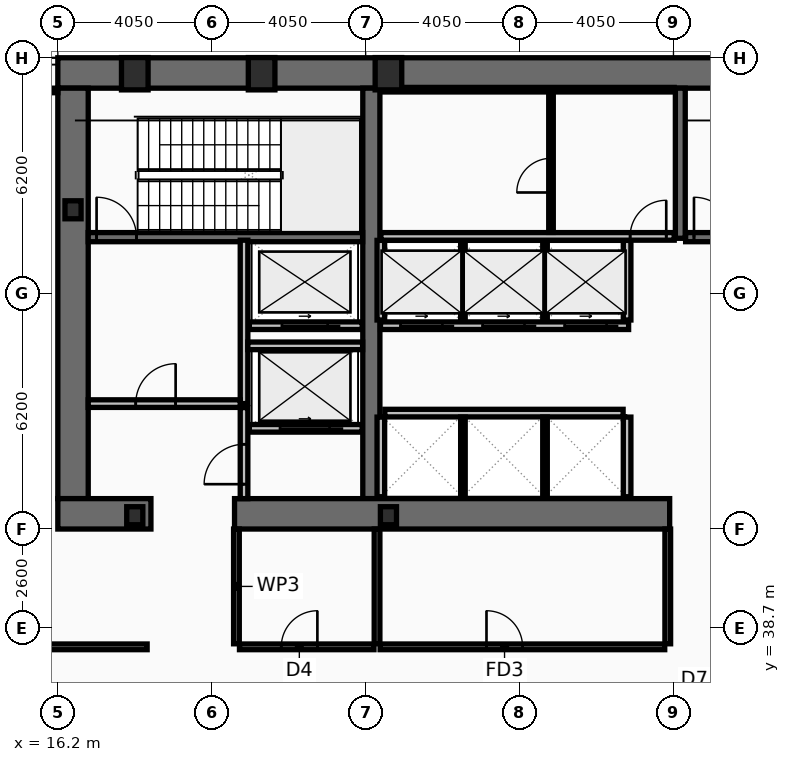
"""IFC4 building model, lengths in metres.
Left out: names, types, materials, properties, quantities, classifications, styles, units other than length and angle.
Written with IfcOpenShell. Run it as: python <this file> out.ifc"""

import sys

from ifc_helpers import new_model, si_unit, direction, frame, frame_2d, origin, origin_2d, place, context, subcontext, project, spatial, rectangle, hollow_rectangle, i_section, extrude, element, fill, save


model = new_model("IFC4")
c1 = context("Model", 3, precision=1e-05, world=origin(), true_north=direction((0.0, 1.0)))
c2 = subcontext(c1, "Body", "Model", "MODEL_VIEW")
j1 = project(units=[si_unit("LENGTHUNIT", "METRE"), si_unit("PLANEANGLEUNIT", "RADIAN")], contexts=[c1])
p1 = place(None, origin())
s1 = spatial("IfcSite", under=j1, at=p1, CompositionType="ELEMENT")
p2 = place(p1, origin())
s2 = spatial("IfcBuilding", under=s1, at=p2, CompositionType="ELEMENT")
p3 = place(p2, frame((0.0, 0.0, 85.8)))
s3 = spatial("IfcBuildingStorey", under=s2, at=p3, CompositionType="ELEMENT", Elevation=85.8)
p4 = place(p3, frame((16.2, 53.3, 0.0), z_axis=(0.0, 0.0, 1.0), x_axis=(1.0, 0.0, 0.0)))
e1 = element("IfcWall", 1, at=p4, inside=s3, PredefinedType="SHEAR", context=c2, shape_type="SweptSolid", body=[
    extrude(rectangle(XDim=40.5, YDim=0.8, at=frame_2d((20.25, 0.0))), origin(), (0.0, 0.0, 1.0), 4.62),
])
p5 = place(p3, frame((16.6, 42.1, 0.0), z_axis=(0.0, 0.0, 1.0), x_axis=(0.0, 1.0, 0.0)))
e2 = element("IfcWall", 2, at=p5, inside=s3, PredefinedType="SHEAR", context=c2, shape_type="SweptSolid", body=[
    extrude(rectangle(XDim=10.8, YDim=0.8, at=frame_2d((5.4, 0.0))), origin(), (0.0, 0.0, 1.0), 4.62),
])
p6 = place(p3, frame((24.45, 42.1, 0.0), z_axis=(0.0, 0.0, 1.0), x_axis=(0.0, 1.0, 0.0)))
e3 = element("IfcWall", 3, at=p6, inside=s3, PredefinedType="SHEAR", context=c2, shape_type="SweptSolid", body=[
    extrude(rectangle(XDim=10.8, YDim=0.45, at=frame_2d((5.4, 0.0))), origin(), (0.0, 0.0, 1.0), 4.62),
])
p7 = place(p3, frame((18.65, 41.7, 0.0), z_axis=(0.0, 0.0, 1.0), x_axis=(-1.0, 0.0, 0.0)))
e4 = element("IfcWall", 4, at=p7, inside=s3, PredefinedType="SHEAR", context=c2, shape_type="SweptSolid", body=[
    extrude(rectangle(XDim=2.45, YDim=0.8, at=frame_2d((1.225, 0.0))), origin(), (0.0, 0.0, 1.0), 4.62),
])
p8 = place(p3, frame((32.3, 41.7, 0.0), z_axis=(0.0, 0.0, 1.0), x_axis=(-1.0, 0.0, 0.0)))
e5 = element("IfcWall", 5, at=p8, inside=s3, PredefinedType="SHEAR", context=c2, shape_type="SweptSolid", body=[
    extrude(rectangle(XDim=11.45, YDim=0.8, at=frame_2d((5.725, 0.0))), origin(), (0.0, 0.0, 1.0), 4.62),
])
p9 = place(p3, frame((32.58, 48.95, 0.0), z_axis=(0.0, 0.0, 1.0), x_axis=(0.0, 1.0, 0.0)))
e6 = element("IfcWall", 6, at=p9, inside=s3, PredefinedType="SHEAR", context=c2, shape_type="SweptSolid", body=[
    extrude(rectangle(XDim=3.95, YDim=0.26, at=frame_2d((1.975, 0.0))), origin(), (0.0, 0.0, 1.0), 4.62),
])
p10 = place(p3, frame((17.0, 48.98, 0.0), z_axis=(0.0, 0.0, 1.0), x_axis=(1.0, 0.0, 0.0)))
e7 = element("IfcWall", 7, at=p10, inside=s3, PredefinedType="SHEAR", context=c2, shape_type="SweptSolid", body=[
    extrude(rectangle(XDim=7.22, YDim=0.24, at=frame_2d((3.61, 0.0))), origin(), (0.0, 0.0, 1.0), 4.62),
])
p11 = place(p10, frame((0.22, 0.0, 0.0)))
e8 = element("IfcOpeningElement", 8, at=p11, cuts=e7, PredefinedType="OPENING", context=c2, shape_type="SweptSolid", body=[
    extrude(rectangle(XDim=1.05, YDim=2.15, at=frame_2d((0.525, 1.075))), frame((0.0, 0.13, 0.0), z_axis=(0.0, -1.0, 0.0), x_axis=(1.0, 0.0, 0.0)), (0.0, 0.0, 1.0), 0.26),
])
p12 = place(p3, frame((32.72, 48.98, 0.0), z_axis=(0.0, 0.0, 1.0), x_axis=(1.0, 0.0, 0.0)))
e9 = element("IfcWall", 9, at=p12, inside=s3, PredefinedType="SHEAR", context=c2, shape_type="SweptSolid", body=[
    extrude(rectangle(XDim=7.56, YDim=0.24, at=frame_2d((3.78, 0.0))), origin(), (0.0, 0.0, 1.0), 4.62),
])
p13 = place(p12, frame((0.22, 0.0, 0.0)))
e10 = element("IfcOpeningElement", 10, at=p13, cuts=e9, PredefinedType="OPENING", context=c2, shape_type="SweptSolid", body=[
    extrude(rectangle(XDim=1.05, YDim=2.15, at=frame_2d((0.525, 1.075))), frame((0.0, 0.13, 0.0), z_axis=(0.0, -1.0, 0.0), x_axis=(1.0, 0.0, 0.0)), (0.0, 0.0, 1.0), 0.26),
])
for number, where, z_axis, x_axis in (
    (11, (18.225, 53.28, 0.0), (0.0, 0.0, 1.0), (1.0, 0.0, 0.0)),
    (12, (21.562, 53.28, 0.0), (0.0, 0.0, 1.0), (1.0, 0.0, 0.0)),
    (13, (24.9, 53.28, 0.0), (0.0, 0.0, 1.0), (1.0, 0.0, 0.0)),
):
    element("IfcColumn", number, at=place(p3, frame(where, z_axis=z_axis, x_axis=x_axis)), inside=s3, PredefinedType="COLUMN", context=c2, shape_type="SweptSolid", body=[
        extrude(hollow_rectangle(XDim=0.7, YDim=0.85, WallThickness=0.05, at=origin_2d()), origin(), (0.0, 0.0, 1.0), 4.8),
    ])
for number, where, z_axis, x_axis in (
    (14, (16.6, 49.7, 0.0), (0.0, 0.0, 1.0), (1.0, 0.0, 0.0)),
    (15, (18.225, 41.65, 0.0), (0.0, 0.0, 1.0), (1.0, 0.0, 0.0)),
    (16, (24.9, 41.65, 0.0), (0.0, 0.0, 1.0), (1.0, 0.0, 0.0)),
):
    element("IfcColumn", number, at=place(p3, frame(where, z_axis=z_axis, x_axis=x_axis)), inside=s3, PredefinedType="COLUMN", context=c2, shape_type="SweptSolid", body=[
        extrude(i_section(OverallWidth=0.424, OverallDepth=0.474, WebThickness=0.048, FlangeThickness=0.077, at=origin_2d()), origin(), (0.0, 0.0, 1.0), 4.8),
    ])
p14 = place(p3, frame((24.21, 43.95, 0.0), z_axis=(0.0, 0.0, 1.0), x_axis=(-1.0, 0.0, 0.0)))
e17 = element("IfcWall", 17, at=p14, inside=s3, PredefinedType="PARTITIONING", context=c2, shape_type="SweptSolid", body=[
    extrude(rectangle(XDim=2.97, YDim=0.2, at=frame_2d((1.485, 0.0))), origin(), (0.0, 0.0, 1.0), 4.62),
])
p15 = place(p14, frame((0.86, 0.0, 0.0)))
e18 = element("IfcOpeningElement", 18, at=p15, cuts=e17, PredefinedType="OPENING", context=c2, shape_type="SweptSolid", body=[
    extrude(rectangle(XDim=1.3, YDim=2.18, at=frame_2d((0.65, 1.09))), frame((0.0, 0.11, 0.0), z_axis=(0.0, -1.0, 0.0), x_axis=(1.0, 0.0, 0.0)), (0.0, 0.0, 1.0), 0.22),
])
p16 = place(p3, frame((24.21, 46.65, 0.0), z_axis=(0.0, 0.0, 1.0), x_axis=(-1.0, 0.0, 0.0)))
e19 = element("IfcWall", 19, at=p16, inside=s3, PredefinedType="PARTITIONING", context=c2, shape_type="SweptSolid", body=[
    extrude(rectangle(XDim=2.97, YDim=0.2, at=frame_2d((1.485, 0.0))), origin(), (0.0, 0.0, 1.0), 4.62),
])
p17 = place(p16, frame((0.91, 0.0, 0.0)))
e20 = element("IfcOpeningElement", 20, at=p17, cuts=e19, PredefinedType="OPENING", context=c2, shape_type="SweptSolid", body=[
    extrude(rectangle(XDim=1.2, YDim=2.18, at=frame_2d((0.6, 1.09))), frame((0.0, 0.11, 0.0), z_axis=(0.0, -1.0, 0.0), x_axis=(1.0, 0.0, 0.0)), (0.0, 0.0, 1.0), 0.22),
])
p18 = place(p3, frame((31.22, 46.65, 0.0), z_axis=(0.0, 0.0, 1.0), x_axis=(-1.0, 0.0, 0.0)))
e21 = element("IfcWall", 21, at=p18, inside=s3, PredefinedType="PARTITIONING", context=c2, shape_type="SweptSolid", body=[
    extrude(rectangle(XDim=6.53, YDim=0.2, at=frame_2d((3.265, 0.0))), origin(), (0.0, 0.0, 1.0), 4.62),
])
p19 = place(p18, frame((4.9, 0.0, 0.0)))
e22 = element("IfcOpeningElement", 22, at=p19, cuts=e21, PredefinedType="OPENING", context=c2, shape_type="SweptSolid", body=[
    extrude(rectangle(XDim=1.1, YDim=2.18, at=frame_2d((0.55, 1.09))), frame((0.0, 0.11, 0.0), z_axis=(0.0, -1.0, 0.0), x_axis=(1.0, 0.0, 0.0)), (0.0, 0.0, 1.0), 0.22),
])
p20 = place(p18, frame((2.74, 0.0, 0.0)))
e23 = element("IfcOpeningElement", 23, at=p20, cuts=e21, PredefinedType="OPENING", context=c2, shape_type="SweptSolid", body=[
    extrude(rectangle(XDim=1.1, YDim=2.18, at=frame_2d((0.55, 1.09))), frame((0.0, 0.11, 0.0), z_axis=(0.0, -1.0, 0.0), x_axis=(1.0, 0.0, 0.0)), (0.0, 0.0, 1.0), 0.22),
])
p21 = place(p18, frame((0.58, 0.0, 0.0)))
e24 = element("IfcOpeningElement", 24, at=p21, cuts=e21, PredefinedType="OPENING", context=c2, shape_type="SweptSolid", body=[
    extrude(rectangle(XDim=1.1, YDim=2.18, at=frame_2d((0.55, 1.09))), frame((0.0, 0.11, 0.0), z_axis=(0.0, -1.0, 0.0), x_axis=(1.0, 0.0, 0.0)), (0.0, 0.0, 1.0), 0.22),
])
p22 = place(p3, frame((21.1, 44.6, 0.0), z_axis=(0.0, 0.0, 1.0), x_axis=(0.0, 1.0, 0.0)))
e25 = element("IfcWall", 25, at=p22, inside=s3, PredefinedType="PARTITIONING", context=c2, shape_type="SweptSolid", body=[
    extrude(rectangle(XDim=4.3, YDim=0.2, at=frame_2d((2.15, 0.0))), origin(), (0.0, 0.0, 1.0), 4.62),
])
p23 = place(p3, frame((17.0, 44.6, 0.0), z_axis=(0.0, 0.0, 1.0), x_axis=(1.0, 0.0, 0.0)))
e26 = element("IfcWall", 26, at=p23, inside=s3, PredefinedType="PARTITIONING", context=c2, shape_type="SweptSolid", body=[
    extrude(rectangle(XDim=4.0, YDim=0.2, at=frame_2d((2.0, 0.0))), origin(), (0.0, 0.0, 1.0), 4.62),
])
p24 = place(p23, frame((1.25, 0.0, 0.0)))
e27 = element("IfcOpeningElement", 27, at=p24, cuts=e26, PredefinedType="OPENING", context=c2, shape_type="SweptSolid", body=[
    extrude(rectangle(XDim=1.05, YDim=2.15, at=frame_2d((0.525, 1.075))), frame((0.0, 0.11, 0.0), z_axis=(0.0, -1.0, 0.0), x_axis=(1.0, 0.0, 0.0)), (0.0, 0.0, 1.0), 0.22),
])
p25 = place(p3, frame((21.2, 46.12, 0.0), z_axis=(0.0, 0.0, 1.0), x_axis=(1.0, 0.0, 0.0)))
e28 = element("IfcWall", 28, at=p25, inside=s3, PredefinedType="PARTITIONING", context=c2, shape_type="SweptSolid", body=[
    extrude(rectangle(XDim=3.02, YDim=0.2, at=frame_2d((1.51, 0.0))), origin(), (0.0, 0.0, 1.0), 4.62),
])
p26 = place(p3, frame((21.1, 42.1, 0.0), z_axis=(0.0, 0.0, 1.0), x_axis=(0.0, 1.0, 0.0)))
e29 = element("IfcWall", 29, at=p26, inside=s3, PredefinedType="PARTITIONING", context=c2, shape_type="SweptSolid", body=[
    extrude(rectangle(XDim=2.395, YDim=0.2, at=frame_2d((1.198, 0.0))), origin(), (0.0, 0.0, 1.0), 4.62),
])
p27 = place(p26, frame((0.38, 0.0, 0.0)))
e30 = element("IfcOpeningElement", 30, at=p27, cuts=e29, PredefinedType="OPENING", context=c2, shape_type="SweptSolid", body=[
    extrude(rectangle(XDim=1.05, YDim=2.15, at=frame_2d((0.525, 1.075))), frame((0.0, 0.11, 0.0), z_axis=(0.0, -1.0, 0.0), x_axis=(1.0, 0.0, 0.0)), (0.0, 0.0, 1.0), 0.22),
])
for number, where, z_axis, x_axis in (
    (31, (24.7, 46.8, 0.0), (0.0, 0.0, 1.0), (0.0, 1.0, 0.0)),
    (32, (31.18, 46.8, 0.0), (0.0, 0.0, 1.0), (0.0, 1.0, 0.0)),
):
    element("IfcWall", number, at=place(p3, frame(where, z_axis=z_axis, x_axis=x_axis)), inside=s3, PredefinedType="PARTITIONING", context=c2, shape_type="SweptSolid", body=[
        extrude(rectangle(XDim=2.095, YDim=0.2, at=frame_2d((1.047, 0.0))), origin(), (0.0, 0.0, 1.0), 4.62),
    ])
for number, where, z_axis, x_axis in (
    (33, (26.86, 46.8, 0.0), (0.0, 0.0, 1.0), (0.0, 1.0, 0.0)),
    (34, (29.02, 46.8, 0.0), (0.0, 0.0, 1.0), (0.0, 1.0, 0.0)),
):
    element("IfcWall", number, at=place(p3, frame(where, z_axis=z_axis, x_axis=x_axis)), inside=s3, PredefinedType="PARTITIONING", context=c2, shape_type="SweptSolid", body=[
        extrude(rectangle(XDim=2.095, YDim=0.12, at=frame_2d((1.047, 0.0))), origin(), (0.0, 0.0, 1.0), 4.62),
    ])
p28 = place(p3, frame((24.805, 44.35, 0.0), z_axis=(0.0, 0.0, 1.0), x_axis=(1.0, 0.0, 0.0)))
e35 = element("IfcWall", 35, at=p28, inside=s3, PredefinedType="PARTITIONING", context=c2, shape_type="SweptSolid", body=[
    extrude(rectangle(XDim=6.27, YDim=0.2, at=frame_2d((3.135, 0.0))), origin(), (0.0, 0.0, 1.0), 4.62),
])
for number, where, z_axis, x_axis in (
    (36, (24.7, 42.15, 0.0), (0.0, 0.0, 1.0), (0.0, 1.0, 0.0)),
    (37, (31.18, 42.15, 0.0), (0.0, 0.0, 1.0), (0.0, 1.0, 0.0)),
):
    element("IfcWall", number, at=place(p3, frame(where, z_axis=z_axis, x_axis=x_axis)), inside=s3, PredefinedType="PARTITIONING", context=c2, shape_type="SweptSolid", body=[
        extrude(rectangle(XDim=2.095, YDim=0.2, at=frame_2d((1.048, 0.0))), origin(), (0.0, 0.0, 1.0), 4.62),
    ])
for number, where, z_axis, x_axis in (
    (38, (26.86, 42.15, 0.0), (0.0, 0.0, 1.0), (0.0, 1.0, 0.0)),
    (39, (29.02, 42.15, 0.0), (0.0, 0.0, 1.0), (0.0, 1.0, 0.0)),
):
    element("IfcWall", number, at=place(p3, frame(where, z_axis=z_axis, x_axis=x_axis)), inside=s3, PredefinedType="PARTITIONING", context=c2, shape_type="SweptSolid", body=[
        extrude(rectangle(XDim=2.095, YDim=0.12, at=frame_2d((1.048, 0.0))), origin(), (0.0, 0.0, 1.0), 4.62),
    ])
p29 = place(p3, frame((24.7, 52.86, 0.0), z_axis=(0.0, 0.0, 1.0), x_axis=(1.0, 0.0, 0.0)))
e40 = element("IfcWall", 40, at=p29, inside=s3, PredefinedType="PARTITIONING", context=c2, shape_type="SweptSolid", body=[
    extrude(rectangle(XDim=7.72, YDim=0.12, at=frame_2d((3.86, 0.0))), origin(), (0.0, 0.0, 1.0), 4.62),
])
p30 = place(p3, frame((24.7, 49.0, 0.0), z_axis=(0.0, 0.0, 1.0), x_axis=(1.0, 0.0, 0.0)))
e41 = element("IfcWall", 41, at=p30, inside=s3, PredefinedType="PARTITIONING", context=c2, shape_type="SweptSolid", body=[
    extrude(rectangle(XDim=7.72, YDim=0.2, at=frame_2d((3.86, 0.0))), origin(), (0.0, 0.0, 1.0), 4.62),
])
p31 = place(p30, frame((6.56, 0.0, 0.0)))
e42 = element("IfcOpeningElement", 42, at=p31, cuts=e41, PredefinedType="OPENING", context=c2, shape_type="SweptSolid", body=[
    extrude(rectangle(XDim=0.95, YDim=2.1, at=frame_2d((0.475, 1.05))), frame((0.0, 0.11, 0.0), z_axis=(0.0, -1.0, 0.0), x_axis=(1.0, 0.0, 0.0)), (0.0, 0.0, 1.0), 0.22),
])
p32 = place(p3, frame((29.177, 49.105, 0.0), z_axis=(0.0, 0.0, 1.0), x_axis=(0.0, 1.0, 0.0)))
e43 = element("IfcWall", 43, at=p32, inside=s3, PredefinedType="PARTITIONING", context=c2, shape_type="SweptSolid", body=[
    extrude(rectangle(XDim=3.69, YDim=0.12, at=frame_2d((1.845, 0.0))), origin(), (0.0, 0.0, 1.0), 4.62),
])
p33 = place(p32, frame((1.05, 0.0, 0.0)))
e44 = element("IfcOpeningElement", 44, at=p33, cuts=e43, PredefinedType="OPENING", context=c2, shape_type="SweptSolid", body=[
    extrude(rectangle(XDim=0.9, YDim=2.05, at=frame_2d((0.45, 1.025))), frame((0.0, 0.07, 0.0), z_axis=(0.0, -1.0, 0.0), x_axis=(1.0, 0.0, 0.0)), (0.0, 0.0, 1.0), 0.14),
])
p34 = place(p3, frame((20.98, 38.2, 0.0), z_axis=(0.0, 0.0, 1.0), x_axis=(1.0, 0.0, 0.0)))
e45 = element("IfcWall", 45, at=p34, inside=s3, PredefinedType="PARTITIONING", context=c2, shape_type="SweptSolid", body=[
    extrude(rectangle(XDim=3.54, YDim=0.15, at=frame_2d((1.77, 0.0))), origin(), (0.0, 0.0, 1.0), 3.81),
])
p35 = place(p34, frame((1.1, 0.0, 0.0)))
e46 = element("IfcOpeningElement", 46, at=p35, cuts=e45, PredefinedType="OPENING", context=c2, shape_type="SweptSolid", body=[
    extrude(rectangle(XDim=0.95, YDim=2.05, at=frame_2d((0.475, 1.025))), frame((0.0, 0.085, 0.0), z_axis=(0.0, -1.0, 0.0), x_axis=(1.0, 0.0, 0.0)), (0.0, 0.0, 1.0), 0.17),
])
p36 = place(p3, frame((24.68, 38.2, 0.0), z_axis=(0.0, 0.0, 1.0), x_axis=(1.0, 0.0, 0.0)))
e47 = element("IfcWall", 47, at=p36, inside=s3, PredefinedType="PARTITIONING", context=c2, shape_type="SweptSolid", body=[
    extrude(rectangle(XDim=7.49, YDim=0.15, at=frame_2d((3.745, 0.0))), origin(), (0.0, 0.0, 1.0), 3.81),
])
p37 = place(p36, frame((2.8, 0.0, 0.0)))
e48 = element("IfcOpeningElement", 48, at=p37, cuts=e47, PredefinedType="OPENING", context=c2, shape_type="SweptSolid", body=[
    extrude(rectangle(XDim=0.95, YDim=2.1, at=frame_2d((0.475, 1.05))), frame((0.0, 0.085, 0.0), z_axis=(0.0, -1.0, 0.0), x_axis=(1.0, 0.0, 0.0)), (0.0, 0.0, 1.0), 0.17),
])
p38 = place(p3, frame((20.9, 38.28, 0.0), z_axis=(0.0, 0.0, 1.0), x_axis=(0.0, 1.0, 0.0)))
e49 = element("IfcWall", 49, at=p38, inside=s3, PredefinedType="PARTITIONING", context=c2, shape_type="SweptSolid", body=[
    extrude(rectangle(XDim=3.02, YDim=0.15, at=frame_2d((1.51, 0.0))), origin(), (0.0, 0.0, 1.0), 4.62),
])
p39 = place(p3, frame((24.6, 38.28, 0.0), z_axis=(0.0, 0.0, 1.0), x_axis=(0.0, 1.0, 0.0)))
e50 = element("IfcWall", 50, at=p39, inside=s3, PredefinedType="PARTITIONING", context=c2, shape_type="SweptSolid", body=[
    extrude(rectangle(XDim=3.02, YDim=0.15, at=frame_2d((1.51, 0.0))), origin(), (0.0, 0.0, 1.0), 3.81),
])
p40 = place(p3, frame((32.25, 38.28, 0.0), z_axis=(0.0, 0.0, 1.0), x_axis=(0.0, 1.0, 0.0)))
e51 = element("IfcWall", 51, at=p40, inside=s3, PredefinedType="PARTITIONING", context=c2, shape_type="SweptSolid", body=[
    extrude(rectangle(XDim=3.02, YDim=0.15, at=frame_2d((1.51, 0.0))), origin(), (0.0, 0.0, 1.0), 4.62),
])
p41 = place(p3, frame((4.095, 38.2, 0.0), z_axis=(0.0, 0.0, 1.0), x_axis=(1.0, 0.0, 0.0)))
e52 = element("IfcWall", 52, at=p41, inside=s3, PredefinedType="PARTITIONING", context=c2, shape_type="SweptSolid", body=[
    extrude(rectangle(XDim=14.455, YDim=0.15, at=frame_2d((7.228, 0.0))), origin(), (0.0, 0.0, 1.0), 3.81),
])
p42 = place(p41, frame((2.4, 0.0, 0.0)))
e53 = element("IfcOpeningElement", 53, at=p42, cuts=e52, PredefinedType="OPENING", context=c2, shape_type="SweptSolid", body=[
    extrude(rectangle(XDim=0.95, YDim=2.1, at=frame_2d((0.475, 1.05))), frame((0.0, 0.085, 0.0), z_axis=(0.0, -1.0, 0.0), x_axis=(1.0, 0.0, 0.0)), (0.0, 0.0, 1.0), 0.17),
])
p43 = place(p3, frame((4.095, 52.84, 0.0), z_axis=(0.0, 0.0, 1.0), x_axis=(1.0, 0.0, 0.0)))
e54 = element("IfcWall", 54, at=p43, inside=s3, PredefinedType="PARTITIONING", context=c2, shape_type="SweptSolid", body=[
    extrude(rectangle(XDim=12.105, YDim=0.12, at=frame_2d((6.052, 0.0))), origin(), (0.0, 0.0, 1.0), 4.62),
])
p44 = place(p11, origin())
e55 = element("IfcDoor", 55, at=p44, inside=s3, OperationType="SINGLE_SWING_LEFT", PredefinedType="DOOR", context=c2, shape_type="SweptSolid", body=[
    extrude(rectangle(XDim=1.05, YDim=2.15, at=frame_2d((0.525, 1.075))), frame((0.0, 0.025, 0.0), z_axis=(0.0, -1.0, 0.0), x_axis=(1.0, 0.0, 0.0)), (0.0, 0.0, 1.0), 0.05),
])
fill(e8, e55)
p45 = place(p13, origin())
e56 = element("IfcDoor", 56, at=p45, inside=s3, OperationType="SINGLE_SWING_LEFT", PredefinedType="DOOR", context=c2, shape_type="SweptSolid", body=[
    extrude(rectangle(XDim=1.05, YDim=2.15, at=frame_2d((0.525, 1.075))), frame((0.0, 0.025, 0.0), z_axis=(0.0, -1.0, 0.0), x_axis=(1.0, 0.0, 0.0)), (0.0, 0.0, 1.0), 0.05),
])
fill(e10, e56)
p46 = place(p15, origin())
e57 = element("IfcDoor", 57, at=p46, inside=s3, OperationType="SLIDING_TO_LEFT", PredefinedType="DOOR", context=c2, shape_type="SweptSolid", body=[
    extrude(rectangle(XDim=1.3, YDim=2.18, at=frame_2d((0.65, 1.09))), frame((0.0, 0.025, 0.0), z_axis=(0.0, -1.0, 0.0), x_axis=(1.0, 0.0, 0.0)), (0.0, 0.0, 1.0), 0.05),
])
fill(e18, e57)
p47 = place(p17, origin())
e58 = element("IfcDoor", 58, at=p47, inside=s3, OperationType="SLIDING_TO_LEFT", PredefinedType="DOOR", context=c2, shape_type="SweptSolid", body=[
    extrude(rectangle(XDim=1.2, YDim=2.18, at=frame_2d((0.6, 1.09))), frame((0.0, 0.025, 0.0), z_axis=(0.0, -1.0, 0.0), x_axis=(1.0, 0.0, 0.0)), (0.0, 0.0, 1.0), 0.05),
])
fill(e20, e58)
p48 = place(p19, origin())
e59 = element("IfcDoor", 59, at=p48, inside=s3, OperationType="SLIDING_TO_LEFT", PredefinedType="DOOR", context=c2, shape_type="SweptSolid", body=[
    extrude(rectangle(XDim=1.1, YDim=2.18, at=frame_2d((0.55, 1.09))), frame((0.0, 0.025, 0.0), z_axis=(0.0, -1.0, 0.0), x_axis=(1.0, 0.0, 0.0)), (0.0, 0.0, 1.0), 0.05),
])
fill(e22, e59)
p49 = place(p20, origin())
e60 = element("IfcDoor", 60, at=p49, inside=s3, OperationType="SLIDING_TO_LEFT", PredefinedType="DOOR", context=c2, shape_type="SweptSolid", body=[
    extrude(rectangle(XDim=1.1, YDim=2.18, at=frame_2d((0.55, 1.09))), frame((0.0, 0.025, 0.0), z_axis=(0.0, -1.0, 0.0), x_axis=(1.0, 0.0, 0.0)), (0.0, 0.0, 1.0), 0.05),
])
fill(e23, e60)
p50 = place(p21, origin())
e61 = element("IfcDoor", 61, at=p50, inside=s3, OperationType="SLIDING_TO_LEFT", PredefinedType="DOOR", context=c2, shape_type="SweptSolid", body=[
    extrude(rectangle(XDim=1.1, YDim=2.18, at=frame_2d((0.55, 1.09))), frame((0.0, 0.025, 0.0), z_axis=(0.0, -1.0, 0.0), x_axis=(1.0, 0.0, 0.0)), (0.0, 0.0, 1.0), 0.05),
])
fill(e24, e61)
p51 = place(p24, origin())
e62 = element("IfcDoor", 62, at=p51, inside=s3, OperationType="SINGLE_SWING_RIGHT", PredefinedType="DOOR", context=c2, shape_type="SweptSolid", body=[
    extrude(rectangle(XDim=1.05, YDim=2.15, at=frame_2d((0.525, 1.075))), frame((0.0, 0.025, 0.0), z_axis=(0.0, -1.0, 0.0), x_axis=(1.0, 0.0, 0.0)), (0.0, 0.0, 1.0), 0.05),
])
fill(e27, e62)
p52 = place(p27, origin())
e63 = element("IfcDoor", 63, at=p52, inside=s3, OperationType="SINGLE_SWING_LEFT", PredefinedType="DOOR", context=c2, shape_type="SweptSolid", body=[
    extrude(rectangle(XDim=1.05, YDim=2.15, at=frame_2d((0.525, 1.075))), frame((0.0, 0.025, 0.0), z_axis=(0.0, -1.0, 0.0), x_axis=(1.0, 0.0, 0.0)), (0.0, 0.0, 1.0), 0.05),
])
fill(e30, e63)
p53 = place(p31, origin())
e64 = element("IfcDoor", 64, at=p53, inside=s3, OperationType="SINGLE_SWING_RIGHT", PredefinedType="DOOR", context=c2, shape_type="SweptSolid", body=[
    extrude(rectangle(XDim=0.95, YDim=2.1, at=frame_2d((0.475, 1.05))), frame((0.0, 0.025, 0.0), z_axis=(0.0, -1.0, 0.0), x_axis=(1.0, 0.0, 0.0)), (0.0, 0.0, 1.0), 0.05),
])
fill(e42, e64)
p54 = place(p33, origin())
e65 = element("IfcDoor", 65, at=p54, inside=s3, OperationType="SINGLE_SWING_LEFT", PredefinedType="DOOR", context=c2, shape_type="SweptSolid", body=[
    extrude(rectangle(XDim=0.9, YDim=2.05, at=frame_2d((0.45, 1.025))), frame((0.0, 0.025, 0.0), z_axis=(0.0, -1.0, 0.0), x_axis=(1.0, 0.0, 0.0)), (0.0, 0.0, 1.0), 0.05),
])
fill(e44, e65)
p55 = place(p35, origin())
e66 = element("IfcDoor", 66, at=p55, inside=s3, OperationType="SINGLE_SWING_RIGHT", PredefinedType="DOOR", context=c2, shape_type="SweptSolid", body=[
    extrude(rectangle(XDim=0.95, YDim=2.05, at=frame_2d((0.475, 1.025))), frame((0.0, 0.025, 0.0), z_axis=(0.0, -1.0, 0.0), x_axis=(1.0, 0.0, 0.0)), (0.0, 0.0, 1.0), 0.05),
])
fill(e46, e66)
p56 = place(p37, origin())
e67 = element("IfcDoor", 67, at=p56, inside=s3, OperationType="SINGLE_SWING_LEFT", PredefinedType="DOOR", context=c2, shape_type="SweptSolid", body=[
    extrude(rectangle(XDim=0.95, YDim=2.1, at=frame_2d((0.475, 1.05))), frame((0.0, 0.025, 0.0), z_axis=(0.0, -1.0, 0.0), x_axis=(1.0, 0.0, 0.0)), (0.0, 0.0, 1.0), 0.05),
])
fill(e48, e67)
save(model, sys.argv[1])
